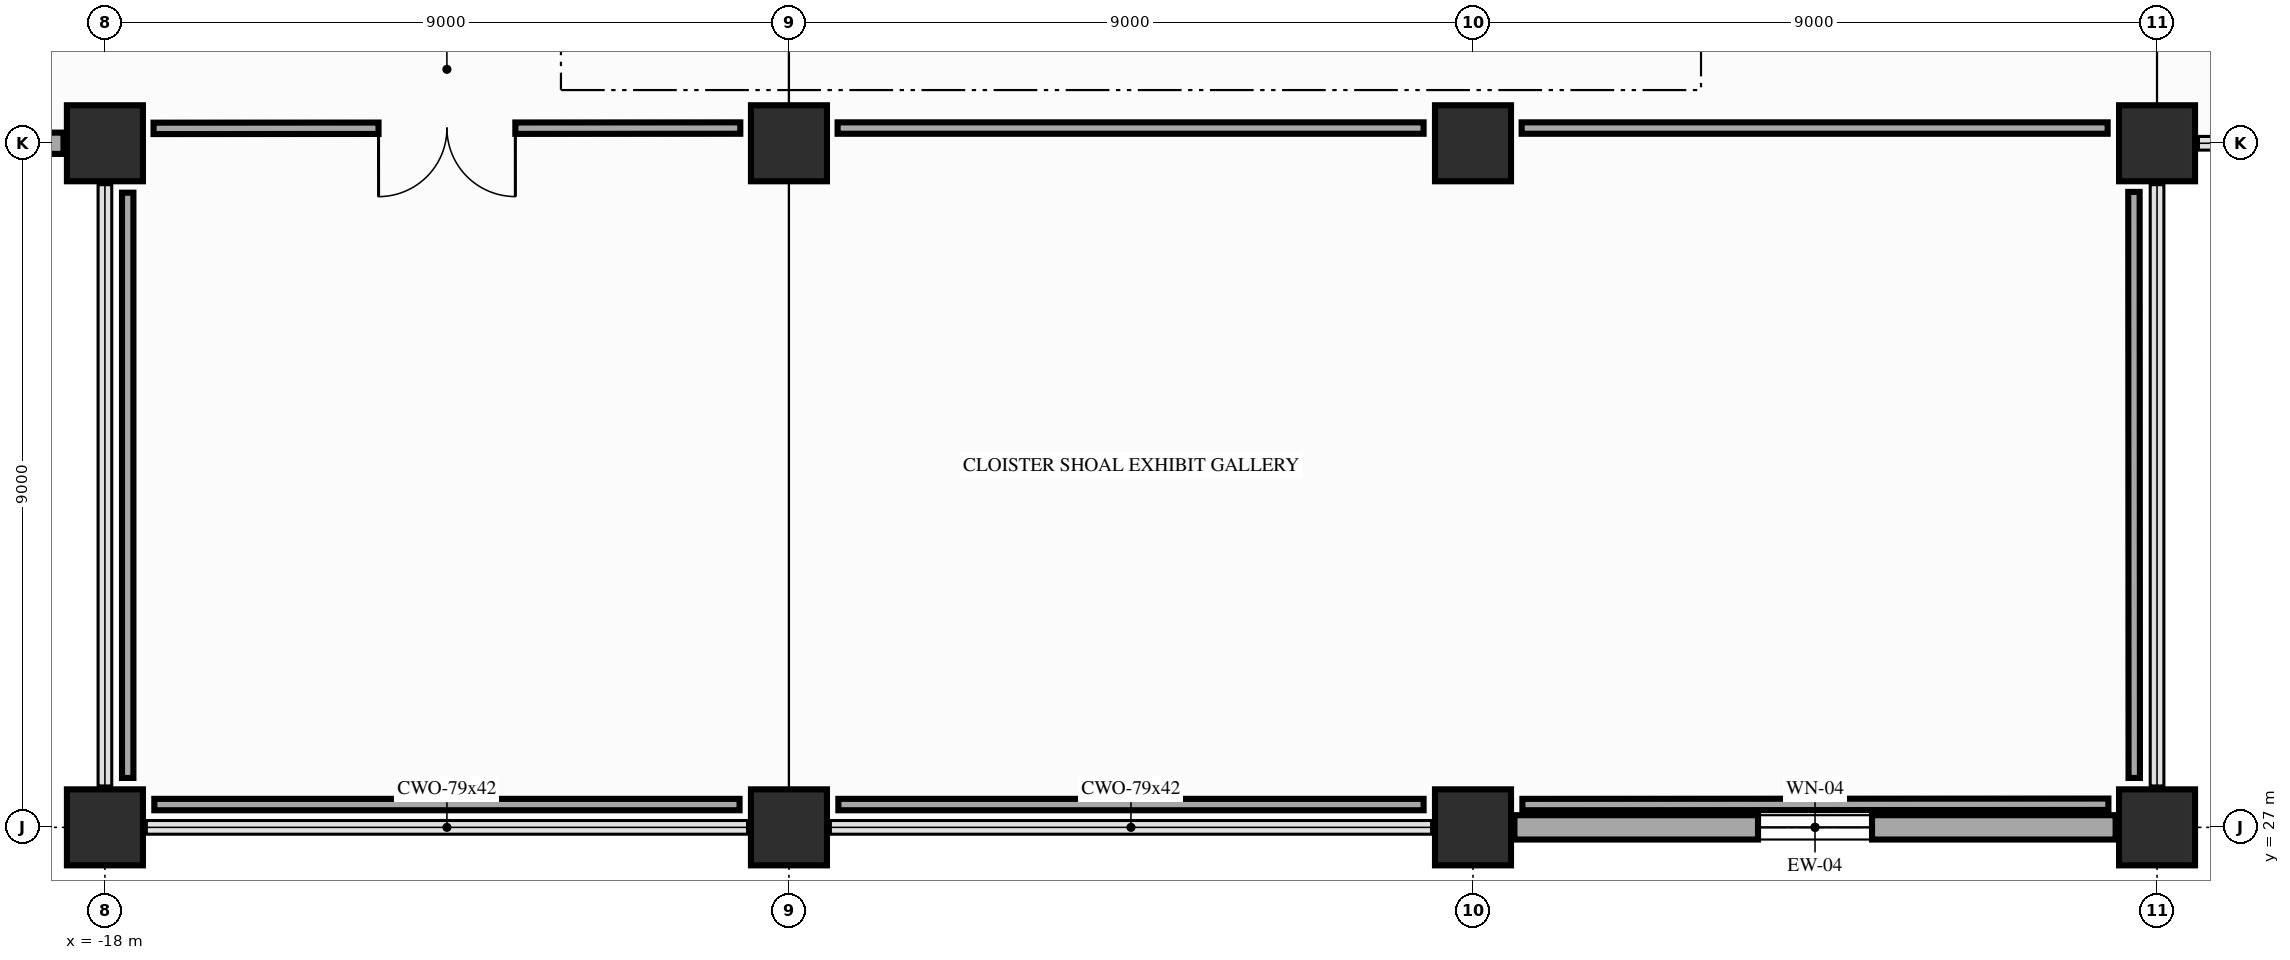
"""IFC4 building model, lengths in metres.
Left out: names, types, materials, properties, quantities, classifications, styles, units other than length and angle.
Written with IfcOpenShell. Run it as: python <this file> out.ifc"""

import sys

from ifc_helpers import new_model, si_unit, direction, frame, frame_2d, origin, origin_2d, place, context, subcontext, project, spatial, rectangle, extrude, element, fill, save


model = new_model("IFC4")
c1 = context("Model", 3, precision=1e-05, world=origin(), true_north=direction((0.0, 1.0)))
c2 = subcontext(c1, "Body", "Model", "MODEL_VIEW")
j1 = project(units=[si_unit("LENGTHUNIT", "METRE"), si_unit("PLANEANGLEUNIT", "RADIAN")], contexts=[c1])
p1 = place(None, origin())
s1 = spatial("IfcSite", under=j1, at=p1, CompositionType="ELEMENT")
p2 = place(p1, origin())
s2 = spatial("IfcBuilding", under=s1, at=p2, CompositionType="ELEMENT")
p3 = place(p2, origin())
s3 = spatial("IfcBuildingStorey", under=s2, at=p3, CompositionType="ELEMENT", Elevation=0.0)
for number, where, z_axis, x_axis in (
    (1, (-18.0, 27.0, 0.0), (0.0, 0.0, 1.0), (1.0, 0.0, 0.0)),
    (2, (-18.0, 36.0, 0.0), (0.0, 0.0, 1.0), (1.0, 0.0, 0.0)),
    (3, (-9.0, 27.0, 0.0), (0.0, 0.0, 1.0), (1.0, 0.0, 0.0)),
    (4, (-9.0, 36.0, 0.0), (0.0, 0.0, 1.0), (1.0, 0.0, 0.0)),
    (5, (0.0, 27.0, 0.0), (0.0, 0.0, 1.0), (1.0, 0.0, 0.0)),
    (6, (0.0, 36.0, 0.0), (0.0, 0.0, 1.0), (1.0, 0.0, 0.0)),
    (7, (9.0, 27.0, 0.0), (0.0, 0.0, 1.0), (1.0, 0.0, 0.0)),
    (8, (9.0, 36.0, 0.0), (0.0, 0.0, 1.0), (1.0, 0.0, 0.0)),
):
    element("IfcColumn", number, at=place(p3, frame(where, z_axis=z_axis, x_axis=x_axis)), inside=s3, PredefinedType="COLUMN", context=c2, shape_type="SweptSolid", body=[
        extrude(rectangle(XDim=1.0, YDim=1.0, at=origin_2d()), origin(), (0.0, 0.0, 1.0), 5.4),
    ])
p4 = place(p3, frame((-18.545, 36.0, 0.0), z_axis=(0.0, 0.0, 1.0), x_axis=(-1.0, 0.0, 0.0)))
e9 = element("IfcWall", 9, at=p4, inside=s3, PredefinedType="SOLIDWALL", context=c2, shape_type="SweptSolid", body=[
    extrude(rectangle(XDim=7.91, YDim=0.28, at=frame_2d((3.955, 0.0))), origin(), (0.0, 0.0, 1.0), 4.205),
])
p5 = place(p4, frame((3.205, 0.0, 0.9)))
e10 = element("IfcOpeningElement", 10, at=p5, cuts=e9, PredefinedType="OPENING", context=c2, shape_type="SweptSolid", body=[
    extrude(rectangle(XDim=1.5, YDim=2.8, at=frame_2d((0.75, 1.4))), frame((0.0, 0.15, 0.0), z_axis=(0.0, -1.0, 0.0), x_axis=(1.0, 0.0, 0.0)), (0.0, 0.0, 1.0), 0.3),
])
p6 = place(p3, frame((8.455, 27.0, 0.0), z_axis=(0.0, 0.0, 1.0), x_axis=(-1.0, 0.0, 0.0)))
e11 = element("IfcWall", 11, at=p6, inside=s3, PredefinedType="SOLIDWALL", context=c2, shape_type="SweptSolid", body=[
    extrude(rectangle(XDim=7.91, YDim=0.32, at=frame_2d((3.955, 0.0))), origin(), (0.0, 0.0, 1.0), 4.205),
])
p7 = place(p6, frame((3.205, 0.0, 0.9)))
e12 = element("IfcOpeningElement", 12, at=p7, cuts=e11, PredefinedType="OPENING", context=c2, shape_type="SweptSolid", body=[
    extrude(rectangle(XDim=1.5, YDim=2.4, at=frame_2d((0.75, 1.2))), frame((0.0, 0.17, 0.0), z_axis=(0.0, -1.0, 0.0), x_axis=(1.0, 0.0, 0.0)), (0.0, 0.0, 1.0), 0.34),
])
for number, where, z_axis, x_axis in (
    (13, (-17.35, 27.3, 0.0), (0.0, 0.0, 1.0), (1.0, 0.0, 0.0)),
    (14, (-8.35, 27.3, 0.0), (0.0, 0.0, 1.0), (1.0, 0.0, 0.0)),
):
    element("IfcWall", number, at=place(p3, frame(where, z_axis=z_axis, x_axis=x_axis)), inside=s3, PredefinedType="PARTITIONING", context=c2, shape_type="SweptSolid", body=[
        extrude(rectangle(XDim=7.7, YDim=0.15, at=frame_2d((3.85, 0.0))), origin(), (0.0, 0.0, 1.0), 4.205),
    ])
p8 = place(p3, frame((0.65, 27.3, 0.0), z_axis=(0.0, 0.0, 1.0), x_axis=(0.999999871661, 0.00050663367, 0.0)))
e15 = element("IfcWall", 15, at=p8, inside=s3, PredefinedType="PARTITIONING", context=c2, shape_type="SweptSolid", body=[
    extrude(rectangle(XDim=7.71, YDim=0.15, at=frame_2d((3.855, 0.0))), origin(), (0.0, 0.0, 1.0), 4.205),
])
p9 = place(p3, frame((8.7, 27.65, 0.0), z_axis=(0.0, 0.0, 1.0), x_axis=(-0.00050663367, 0.999999871661, 0.0)))
e16 = element("IfcWall", 16, at=p9, inside=s3, PredefinedType="PARTITIONING", context=c2, shape_type="SweptSolid", body=[
    extrude(rectangle(XDim=7.71, YDim=0.15, at=frame_2d((3.855, 0.0))), origin(), (0.0, 0.0, 1.0), 4.255),
])
for number, where, z_axis, x_axis in (
    (17, (8.35, 36.2, 0.0), (0.0, 0.0, 1.0), (-1.0, 0.0, 0.0)),
    (18, (-0.65, 36.2, 0.0), (0.0, 0.0, 1.0), (-1.0, 0.0, 0.0)),
):
    element("IfcWall", number, at=place(p3, frame(where, z_axis=z_axis, x_axis=x_axis)), inside=s3, PredefinedType="PARTITIONING", context=c2, shape_type="SweptSolid", body=[
        extrude(rectangle(XDim=7.71, YDim=0.15, at=frame_2d((3.855, 0.0))), origin(), (0.0, 0.0, 1.0), 4.205),
    ])
p10 = place(p3, frame((-9.64, 36.2, 0.0), z_axis=(0.0, 0.0, 1.0), x_axis=(-0.999999871994, -0.000505976787, 0.0)))
e19 = element("IfcWall", 19, at=p10, inside=s3, PredefinedType="PARTITIONING", context=c2, shape_type="SweptSolid", body=[
    extrude(rectangle(XDim=7.72, YDim=0.15, at=frame_2d((3.86, 0.0))), origin(), (0.0, 0.0, 1.0), 4.205),
])
p11 = place(p10, frame((2.96, 0.0, 0.0)))
e20 = element("IfcOpeningElement", 20, at=p11, cuts=e19, PredefinedType="OPENING", context=c2, shape_type="SweptSolid", body=[
    extrude(rectangle(XDim=1.8, YDim=2.3, at=frame_2d((0.9, 1.15))), frame((0.0, 0.085, 0.0), z_axis=(0.0, -1.0, 0.0), x_axis=(1.0, 0.0, 0.0)), (0.0, 0.0, 1.0), 0.17),
])
p12 = place(p3, frame((-17.7, 35.35, 0.0), z_axis=(0.0, 0.0, 1.0), x_axis=(0.0, -1.0, 0.0)))
e21 = element("IfcWall", 21, at=p12, inside=s3, PredefinedType="PARTITIONING", context=c2, shape_type="SweptSolid", body=[
    extrude(rectangle(XDim=7.7, YDim=0.15, at=frame_2d((3.85, 0.0))), origin(), (0.0, 0.0, 1.0), 4.255),
])
p13 = place(p7, origin())
e22 = element("IfcWindow", 22, at=p13, inside=s3, PartitioningType="SINGLE_PANEL", PredefinedType="WINDOW", context=c2, shape_type="SweptSolid", body=[
    extrude(rectangle(XDim=1.5, YDim=2.4, at=frame_2d((0.75, 1.2))), frame((0.0, 0.03, 0.0), z_axis=(0.0, -1.0, 0.0), x_axis=(1.0, 0.0, 0.0)), (0.0, 0.0, 1.0), 0.06),
])
fill(e12, e22)
p14 = place(p11, origin())
e23 = element("IfcDoor", 23, at=p14, inside=s3, OperationType="DOUBLE_DOOR_SINGLE_SWING", PredefinedType="DOOR", context=c2, shape_type="SweptSolid", body=[
    extrude(rectangle(XDim=1.8, YDim=2.3, at=frame_2d((0.9, 1.15))), frame((0.0, 0.025, 0.0), z_axis=(0.0, -1.0, 0.0), x_axis=(1.0, 0.0, 0.0)), (0.0, 0.0, 1.0), 0.05),
])
fill(e20, e23)
save(model, sys.argv[1])
